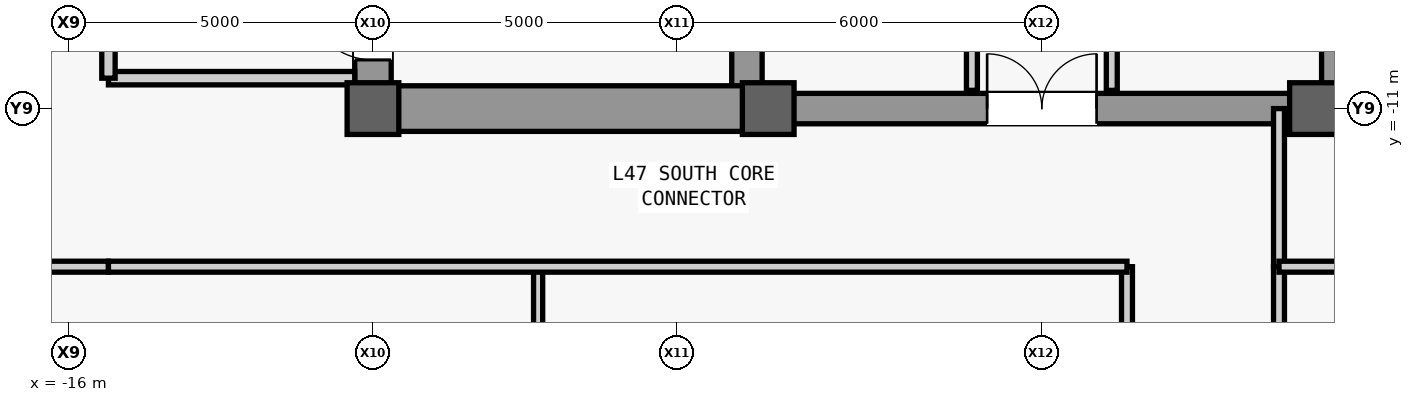
"""IFC4 building model, lengths in metres.
Left out: names, types, materials, properties, quantities, classifications, styles, units other than length and angle.
Written with IfcOpenShell. Run it as: python <this file> out.ifc"""

import sys

from ifc_helpers import new_model, si_unit, direction, frame, frame_2d, origin, origin_2d, place, context, subcontext, project, spatial, rectangle, extrude, source, transform, mapped, element, fill, save


model = new_model("IFC4")
c1 = context("Model", 3, precision=1e-05, world=origin(), true_north=direction((0.0, 1.0)))
c2 = subcontext(c1, "Body", "Model", "MODEL_VIEW")
j1 = project(units=[si_unit("LENGTHUNIT", "METRE"), si_unit("PLANEANGLEUNIT", "RADIAN")], contexts=[c1])
p1 = place(None, origin())
s1 = spatial("IfcSite", under=j1, at=p1, CompositionType="ELEMENT")
p2 = place(p1, origin())
s2 = spatial("IfcBuilding", under=s1, at=p2, CompositionType="ELEMENT")
p3 = place(p2, frame((0.0, 0.0, 203.1)))
s3 = spatial("IfcBuildingStorey", under=s2, at=p3, CompositionType="ELEMENT", Elevation=203.1)
m1 = source(origin(), c2, "Body", "SweptSolid", [
    extrude(rectangle(XDim=22.0, YDim=0.6, at=frame_2d((11.0, 0.0))), origin(), (0.0, 0.0, 1.0), 3.78),
])
p4 = place(p3, frame((-11.0, -11.0, 0.0), z_axis=(0.0, 0.0, 1.0), x_axis=(0.0, 1.0, 0.0)))
e1 = element("IfcWall", 1, at=p4, inside=s3, PredefinedType="SHEAR", context=c2, shape_type="MappedRepresentation", body=[
    mapped(m1, transform((0.0, 0.0, 0.0), scale=1.0)),
])
m2 = source(origin(), c2, "Body", "SweptSolid", [
    extrude(rectangle(XDim=1.1, YDim=2.2, at=frame_2d((0.55, 1.1))), frame((0.0, 0.31, 0.0), z_axis=(0.0, -1.0, 0.0), x_axis=(1.0, 0.0, 0.0)), (0.0, 0.0, 1.0), 0.62),
])
p5 = place(p4, frame((0.8, 0.0, 0.0)))
e2 = element("IfcOpeningElement", 2, at=p5, cuts=e1, PredefinedType="OPENING", context=c2, shape_type="MappedRepresentation", body=[
    mapped(m2, transform((0.0, 0.0, 0.0), scale=1.0)),
])
p6 = place(p4, frame((12.5, 0.0, 0.0)))
e3 = element("IfcOpeningElement", 3, at=p6, cuts=e1, PredefinedType="OPENING", context=c2, shape_type="MappedRepresentation", body=[
    mapped(m2, transform((0.0, 0.0, 0.0), scale=1.0)),
])
m3 = source(origin(), c2, "Body", "SweptSolid", [
    extrude(rectangle(XDim=0.9, YDim=2.15, at=frame_2d((0.45, 1.075))), frame((0.0, 0.31, 0.0), z_axis=(0.0, -1.0, 0.0), x_axis=(1.0, 0.0, 0.0)), (0.0, 0.0, 1.0), 0.62),
])
p7 = place(p4, frame((7.575, 0.0, 0.0)))
e4 = element("IfcOpeningElement", 4, at=p7, cuts=e1, PredefinedType="OPENING", context=c2, shape_type="MappedRepresentation", body=[
    mapped(m3, transform((0.0, 0.0, 0.0), scale=1.0)),
])
m4 = source(origin(), c2, "Body", "SweptSolid", [
    extrude(rectangle(XDim=1.3, YDim=2.3, at=frame_2d((0.65, 1.15))), frame((0.0, 0.31, 0.0), z_axis=(0.0, -1.0, 0.0), x_axis=(1.0, 0.0, 0.0)), (0.0, 0.0, 1.0), 0.62),
])
p8 = place(p4, frame((2.7, 0.0, 0.0)))
e5 = element("IfcOpeningElement", 5, at=p8, cuts=e1, PredefinedType="OPENING", context=c2, shape_type="MappedRepresentation", body=[
    mapped(m4, transform((0.0, 0.0, 0.0), scale=1.0)),
])
m5 = source(origin(), c2, "Body", "SweptSolid", [
    extrude(rectangle(XDim=21.4, YDim=0.5, at=frame_2d((10.7, 0.0))), origin(), (0.0, 0.0, 1.0), 3.78),
])
for number, where, z_axis, x_axis in (
    (6, (-4.85, -10.7, 0.0), (0.0, 0.0, 1.0), (0.0, 1.0, 0.0)),
    (7, (4.85, -10.7, 0.0), (0.0, 0.0, 1.0), (0.0, 1.0, 0.0)),
):
    element("IfcWall", number, at=place(p3, frame(where, z_axis=z_axis, x_axis=x_axis)), inside=s3, PredefinedType="SHEAR", context=c2, shape_type="MappedRepresentation", body=[
        mapped(m5, transform((0.0, 0.0, 0.0), scale=1.0)),
    ])
m6 = source(origin(), c2, "Body", "SweptSolid", [
    extrude(rectangle(XDim=5.85, YDim=0.75, at=frame_2d((2.925, 0.0))), origin(), (0.0, 0.0, 1.0), 3.78),
])
p9 = place(p3, frame((-10.7, -11.0, 0.0), z_axis=(0.0, 0.0, 1.0), x_axis=(1.0, 0.0, 0.0)))
e8 = element("IfcWall", 8, at=p9, inside=s3, PredefinedType="SHEAR", context=c2, shape_type="MappedRepresentation", body=[
    mapped(m6, transform((0.0, 0.0, 0.0), scale=1.0)),
])
m7 = source(origin(), c2, "Body", "SweptSolid", [
    extrude(rectangle(XDim=9.2, YDim=0.5, at=frame_2d((4.6, 0.0))), origin(), (0.0, 0.0, 1.0), 3.78),
])
p10 = place(p3, frame((-4.6, -11.0, 0.0), z_axis=(0.0, 0.0, 1.0), x_axis=(1.0, 0.0, 0.0)))
e9 = element("IfcWall", 9, at=p10, inside=s3, PredefinedType="SHEAR", context=c2, shape_type="MappedRepresentation", body=[
    mapped(m7, transform((0.0, 0.0, 0.0), scale=1.0)),
])
m8 = source(origin(), c2, "Body", "SweptSolid", [
    extrude(rectangle(XDim=1.8, YDim=2.25, at=frame_2d((0.9, 1.125))), frame((0.0, 0.26, 0.0), z_axis=(0.0, -1.0, 0.0), x_axis=(1.0, 0.0, 0.0)), (0.0, 0.0, 1.0), 0.52),
])
p11 = place(p10, frame((3.7, 0.0, 0.0)))
e10 = element("IfcOpeningElement", 10, at=p11, cuts=e9, PredefinedType="OPENING", context=c2, shape_type="MappedRepresentation", body=[
    mapped(m8, transform((0.0, 0.0, 0.0), scale=1.0)),
])
m9 = source(origin(), c2, "Body", "SweptSolid", [
    extrude(rectangle(XDim=0.85, YDim=0.85, at=origin_2d()), origin(), (0.0, 0.0, 1.0), 4.0),
])
for number, where, z_axis, x_axis in (
    (11, (-11.0, -11.0, 0.0), (0.0, 0.0, 1.0), (1.0, 0.0, 0.0)),
    (12, (-4.5, -11.0, 0.0), (0.0, 0.0, 1.0), (1.0, 0.0, 0.0)),
    (13, (4.5, -11.0, 0.0), (0.0, 0.0, 1.0), (1.0, 0.0, 0.0)),
):
    element("IfcColumn", number, at=place(p3, frame(where, z_axis=z_axis, x_axis=x_axis)), inside=s3, PredefinedType="COLUMN", context=c2, shape_type="MappedRepresentation", body=[
        mapped(m9, transform((0.0, 0.0, 0.0), scale=1.0)),
    ])
m10 = source(origin(), c2, "Body", "SweptSolid", [
    extrude(rectangle(XDim=4.05, YDim=0.22, at=frame_2d((2.025, 0.0))), origin(), (0.0, 0.0, 1.0), 3.78),
])
p12 = place(p3, frame((-15.35, -10.5, 0.0), z_axis=(0.0, 0.0, 1.0), x_axis=(1.0, 0.0, 0.0)))
e14 = element("IfcWall", 14, at=p12, inside=s3, PredefinedType="PARTITIONING", context=c2, shape_type="MappedRepresentation", body=[
    mapped(m10, transform((0.0, 0.0, 0.0), scale=1.0)),
])
m11 = source(origin(), c2, "Body", "SweptSolid", [
    extrude(rectangle(XDim=4.4, YDim=0.22, at=frame_2d((2.2, 0.0))), origin(), (0.0, 0.0, 1.0), 3.78),
])
p13 = place(p3, frame((-15.35, -10.5, 0.0), z_axis=(0.0, 0.0, 1.0), x_axis=(0.0, 1.0, 0.0)))
e15 = element("IfcWall", 15, at=p13, inside=s3, PredefinedType="PARTITIONING", context=c2, shape_type="MappedRepresentation", body=[
    mapped(m11, transform((0.0, 0.0, 0.0), scale=1.0)),
])
m12 = source(origin(), c2, "Body", "SweptSolid", [
    extrude(rectangle(XDim=1.2, YDim=2.2, at=frame_2d((0.6, 1.1))), frame((0.0, 0.12, 0.0), z_axis=(0.0, -1.0, 0.0), x_axis=(1.0, 0.0, 0.0)), (0.0, 0.0, 1.0), 0.24),
])
p14 = place(p13, frame((1.6, 0.0, 0.0)))
e16 = element("IfcOpeningElement", 16, at=p14, cuts=e15, PredefinedType="OPENING", context=c2, shape_type="MappedRepresentation", body=[
    mapped(m12, transform((0.0, 0.0, 0.0), scale=1.0)),
])
m13 = source(origin(), c2, "Body", "SweptSolid", [
    extrude(rectangle(XDim=5.4, YDim=0.18, at=frame_2d((2.7, 0.0))), origin(), (0.0, 0.0, 1.0), 3.78),
])
p15 = place(p3, frame((-1.15, -10.7, 0.0), z_axis=(0.0, 0.0, 1.0), x_axis=(0.0, 1.0, 0.0)))
e17 = element("IfcWall", 17, at=p15, inside=s3, PredefinedType="PARTITIONING", context=c2, shape_type="MappedRepresentation", body=[
    mapped(m13, transform((0.0, 0.0, 0.0), scale=1.0)),
])
m14 = source(origin(), c2, "Body", "SweptSolid", [
    extrude(rectangle(XDim=0.9, YDim=2.15, at=frame_2d((0.45, 1.075))), frame((0.0, 0.1, 0.0), z_axis=(0.0, -1.0, 0.0), x_axis=(1.0, 0.0, 0.0)), (0.0, 0.0, 1.0), 0.2),
])
p16 = place(p15, frame((1.15, 0.0, 0.0)))
e18 = element("IfcOpeningElement", 18, at=p16, cuts=e17, PredefinedType="OPENING", context=c2, shape_type="MappedRepresentation", body=[
    mapped(m14, transform((0.0, 0.0, 0.0), scale=1.0)),
])
p17 = place(p15, frame((3.85, 0.0, 0.0)))
e19 = element("IfcOpeningElement", 19, at=p17, cuts=e17, PredefinedType="OPENING", context=c2, shape_type="MappedRepresentation", body=[
    mapped(m14, transform((0.0, 0.0, 0.0), scale=1.0)),
])
p18 = place(p3, frame((1.15, -10.7, 0.0), z_axis=(0.0, 0.0, 1.0), x_axis=(0.0, 1.0, 0.0)))
e20 = element("IfcWall", 20, at=p18, inside=s3, PredefinedType="PARTITIONING", context=c2, shape_type="MappedRepresentation", body=[
    mapped(m13, transform((0.0, 0.0, 0.0), scale=1.0)),
])
p19 = place(p18, frame((2.25, 0.0, 0.0)))
e21 = element("IfcOpeningElement", 21, at=p19, cuts=e20, PredefinedType="OPENING", context=c2, shape_type="MappedRepresentation", body=[
    mapped(m14, transform((0.0, 0.0, 0.0), scale=1.0)),
])
m15 = source(origin(), c2, "Body", "SweptSolid", [
    extrude(rectangle(XDim=2.45, YDim=0.18, at=frame_2d((1.225, 0.0))), origin(), (0.0, 0.0, 1.0), 3.78),
])
p20 = place(p3, frame((-17.8, -13.6, 0.0), z_axis=(0.0, 0.0, 1.0), x_axis=(1.0, 0.0, 0.0)))
e22 = element("IfcWall", 22, at=p20, inside=s3, PredefinedType="PARTITIONING", context=c2, shape_type="MappedRepresentation", body=[
    mapped(m15, transform((0.0, 0.0, 0.0), scale=1.0)),
])
m16 = source(origin(), c2, "Body", "SweptSolid", [
    extrude(rectangle(XDim=2.6, YDim=0.18, at=frame_2d((1.3, 0.0))), origin(), (0.0, 0.0, 1.0), 3.78),
])
p21 = place(p3, frame((3.9, -13.6, 0.0), z_axis=(0.0, 0.0, 1.0), x_axis=(0.0, 1.0, 0.0)))
e23 = element("IfcWall", 23, at=p21, inside=s3, PredefinedType="PARTITIONING", context=c2, shape_type="MappedRepresentation", body=[
    mapped(m16, transform((0.0, 0.0, 0.0), scale=1.0)),
])
m17 = source(origin(), c2, "Body", "SweptSolid", [
    extrude(rectangle(XDim=16.4, YDim=0.15, at=frame_2d((8.2, 0.0))), origin(), (0.0, 0.0, 1.0), 3.78),
])
p22 = place(p3, frame((-8.284, -30.0, 0.0), z_axis=(0.0, 0.0, 1.0), x_axis=(0.0, 1.0, 0.0)))
e24 = element("IfcWall", 24, at=p22, inside=s3, PredefinedType="PARTITIONING", context=c2, shape_type="MappedRepresentation", body=[
    mapped(m17, transform((0.0, 0.0, 0.0), scale=1.0)),
])
m18 = source(origin(), c2, "Body", "SweptSolid", [
    extrude(rectangle(XDim=0.95, YDim=2.15, at=frame_2d((0.475, 1.075))), frame((0.0, 0.085, 0.0), z_axis=(0.0, -1.0, 0.0), x_axis=(1.0, 0.0, 0.0)), (0.0, 0.0, 1.0), 0.17),
])
p23 = place(p22, frame((11.825, 0.0, 0.0)))
e25 = element("IfcOpeningElement", 25, at=p23, cuts=e24, PredefinedType="OPENING", context=c2, shape_type="MappedRepresentation", body=[
    mapped(m18, transform((0.0, 0.0, 0.0), scale=1.0)),
])
m19 = source(origin(), c2, "Body", "SweptSolid", [
    extrude(rectangle(XDim=16.4, YDim=0.18, at=frame_2d((8.2, 0.0))), origin(), (0.0, 0.0, 1.0), 3.78),
])
p24 = place(p3, frame((1.4, -30.0, 0.0), z_axis=(0.0, 0.0, 1.0), x_axis=(0.0, 1.0, 0.0)))
e26 = element("IfcWall", 26, at=p24, inside=s3, PredefinedType="PARTITIONING", context=c2, shape_type="MappedRepresentation", body=[
    mapped(m19, transform((0.0, 0.0, 0.0), scale=1.0)),
])
m20 = source(origin(), c2, "Body", "SweptSolid", [
    extrude(rectangle(XDim=1.05, YDim=2.2, at=frame_2d((0.525, 1.1))), frame((0.0, 0.1, 0.0), z_axis=(0.0, -1.0, 0.0), x_axis=(1.0, 0.0, 0.0)), (0.0, 0.0, 1.0), 0.2),
])
p25 = place(p24, frame((3.575, 0.0, 0.0)))
e27 = element("IfcOpeningElement", 27, at=p25, cuts=e26, PredefinedType="OPENING", context=c2, shape_type="MappedRepresentation", body=[
    mapped(m20, transform((0.0, 0.0, 0.0), scale=1.0)),
])
m21 = source(origin(), c2, "Body", "SweptSolid", [
    extrude(rectangle(XDim=16.75, YDim=0.18, at=frame_2d((8.375, 0.0))), origin(), (0.0, 0.0, 1.0), 3.78),
])
p26 = place(p3, frame((-15.35, -13.6, 0.0), z_axis=(0.0, 0.0, 1.0), x_axis=(1.0, 0.0, 0.0)))
e28 = element("IfcWall", 28, at=p26, inside=s3, PredefinedType="PARTITIONING", context=c2, shape_type="MappedRepresentation", body=[
    mapped(m21, transform((0.0, 0.0, 0.0), scale=1.0)),
])
p27 = place(p3, frame((3.9, -30.0, 0.0), z_axis=(0.0, 0.0, 1.0), x_axis=(0.0, 1.0, 0.0)))
e29 = element("IfcWall", 29, at=p27, inside=s3, PredefinedType="PARTITIONING", context=c2, shape_type="MappedRepresentation", body=[
    mapped(m19, transform((0.0, 0.0, 0.0), scale=1.0)),
])
p28 = place(p27, frame((3.575, 0.0, 0.0)))
e30 = element("IfcOpeningElement", 30, at=p28, cuts=e29, PredefinedType="OPENING", context=c2, shape_type="MappedRepresentation", body=[
    mapped(m20, transform((0.0, 0.0, 0.0), scale=1.0)),
])
m22 = source(origin(), c2, "Body", "SweptSolid", [
    extrude(rectangle(XDim=11.45, YDim=0.18, at=frame_2d((5.725, 0.0))), origin(), (0.0, 0.0, 1.0), 3.78),
])
p29 = place(p3, frame((3.9, -13.6, 0.0), z_axis=(0.0, 0.0, 1.0), x_axis=(1.0, 0.0, 0.0)))
e31 = element("IfcWall", 31, at=p29, inside=s3, PredefinedType="PARTITIONING", context=c2, shape_type="MappedRepresentation", body=[
    mapped(m22, transform((0.0, 0.0, 0.0), scale=1.0)),
])
m23 = source(origin(), c2, "Body", "SweptSolid", [
    extrude(rectangle(XDim=1.1, YDim=2.2, at=frame_2d((0.55, 1.1))), frame((0.0, 0.025, 0.0), z_axis=(0.0, -1.0, 0.0), x_axis=(1.0, 0.0, 0.0)), (0.0, 0.0, 1.0), 0.05),
])
p30 = place(p5, origin())
e32 = element("IfcDoor", 32, at=p30, inside=s3, OperationType="SINGLE_SWING_RIGHT", PredefinedType="DOOR", context=c2, shape_type="MappedRepresentation", body=[
    mapped(m23, transform((0.0, 0.0, 0.0), scale=1.0)),
])
fill(e2, e32)
m24 = source(origin(), c2, "Body", "SweptSolid", [
    extrude(rectangle(XDim=1.8, YDim=2.25, at=frame_2d((0.9, 1.125))), frame((0.0, 0.025, 0.0), z_axis=(0.0, -1.0, 0.0), x_axis=(1.0, 0.0, 0.0)), (0.0, 0.0, 1.0), 0.05),
])
p31 = place(p11, origin())
e33 = element("IfcDoor", 33, at=p31, inside=s3, OperationType="SINGLE_SWING_LEFT", PredefinedType="DOOR", context=c2, shape_type="MappedRepresentation", body=[
    mapped(m24, transform((0.0, 0.0, 0.0), scale=1.0)),
])
fill(e10, e33)
save(model, sys.argv[1])
